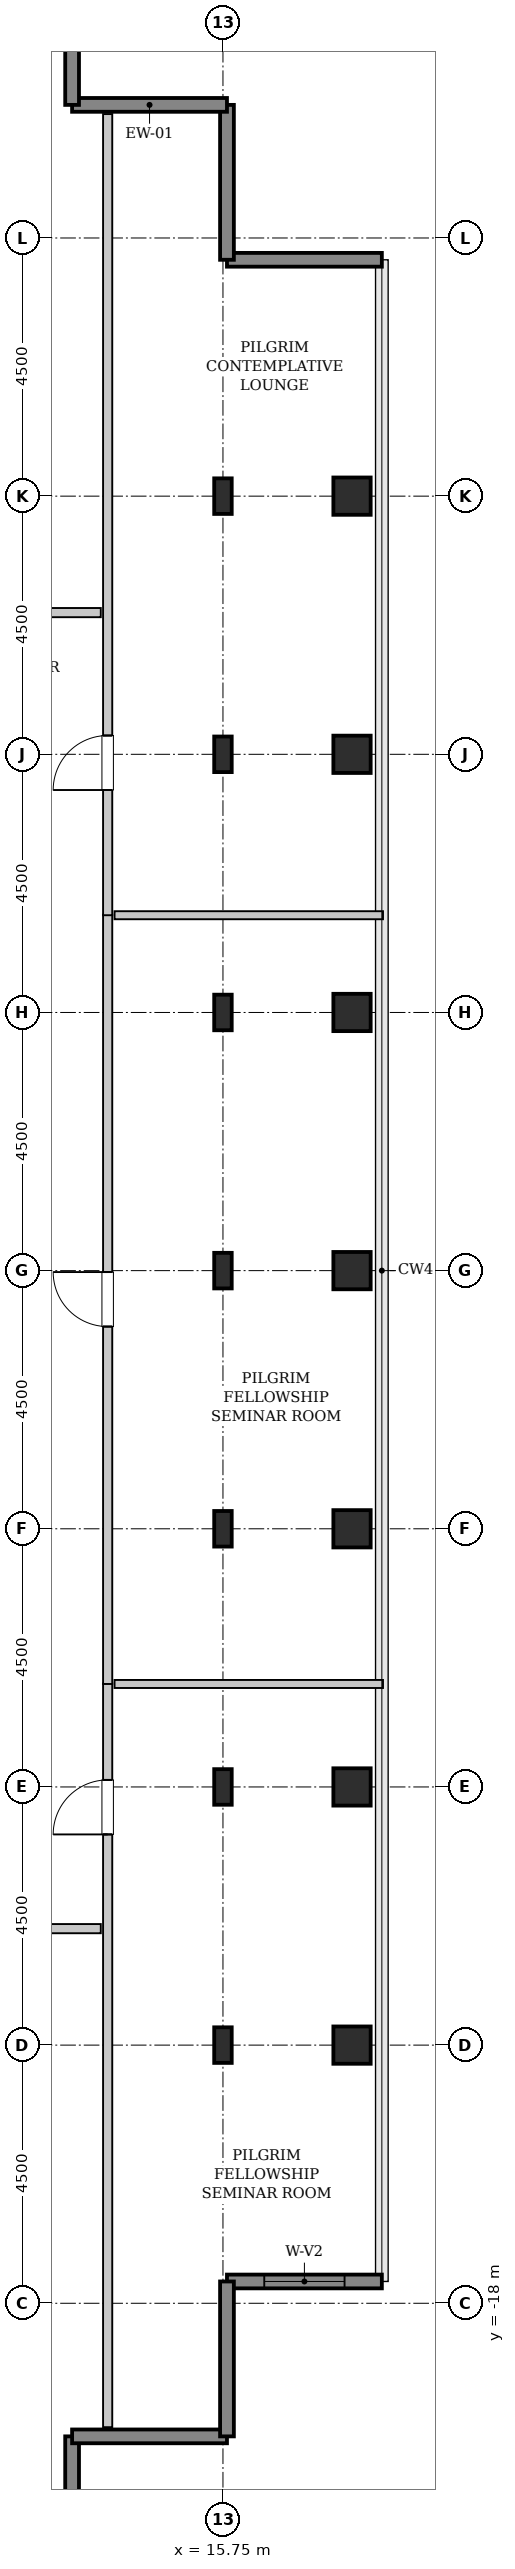
"""IFC4 building model, lengths in metres.
Left out: names, types, materials, properties, quantities, classifications, styles, units other than length and angle.
Written with IfcOpenShell. Run it as: python <this file> out.ifc"""

import sys

from ifc_helpers import new_model, si_unit, direction, frame, frame_2d, origin, origin_2d, place, context, subcontext, project, spatial, rectangle, hollow_rectangle, i_section, extrude, source, transform, mapped, element, fill, save


model = new_model("IFC4")
c1 = context("Model", 3, precision=1e-05, world=origin(), true_north=direction((0.0, 1.0)))
c2 = subcontext(c1, "Body", "Model", "MODEL_VIEW")
j1 = project(units=[si_unit("LENGTHUNIT", "METRE"), si_unit("PLANEANGLEUNIT", "RADIAN")], contexts=[c1])
p1 = place(None, origin())
s1 = spatial("IfcSite", under=j1, at=p1, CompositionType="ELEMENT")
p2 = place(p1, origin())
s2 = spatial("IfcBuilding", under=s1, at=p2, CompositionType="ELEMENT")
p3 = place(p2, frame((0.0, 0.0, 283.6)))
s3 = spatial("IfcBuildingStorey", under=s2, at=p3, CompositionType="ELEMENT", Elevation=283.6)
m1 = source(origin(), c2, "Body", "SweptSolid", [
    extrude(i_section(OverallWidth=0.305, OverallDepth=0.62, WebThickness=0.021, FlangeThickness=0.04, FilletRadius=0.027, at=origin_2d()), origin(), (0.0, 0.0, 1.0), 3.8),
])
for number, where, z_axis, x_axis in (
    (1, (15.75, -13.5, 0.0), (0.0, 0.0, 1.0), (1.0, 0.0, 0.0)),
    (2, (15.75, -9.0, 0.0), (0.0, 0.0, 1.0), (1.0, 0.0, 0.0)),
    (3, (15.75, -4.5, 0.0), (0.0, 0.0, 1.0), (1.0, 0.0, 0.0)),
    (4, (15.75, 0.0, 0.0), (0.0, 0.0, 1.0), (1.0, 0.0, 0.0)),
    (5, (15.75, 4.5, 0.0), (0.0, 0.0, 1.0), (1.0, 0.0, 0.0)),
    (6, (15.75, 9.0, 0.0), (0.0, 0.0, 1.0), (1.0, 0.0, 0.0)),
    (7, (15.75, 13.5, 0.0), (0.0, 0.0, 1.0), (1.0, 0.0, 0.0)),
):
    element("IfcColumn", number, at=place(p3, frame(where, z_axis=z_axis, x_axis=x_axis)), inside=s3, PredefinedType="COLUMN", context=c2, shape_type="MappedRepresentation", body=[
        mapped(m1, transform((0.0, 0.0, 0.0), x_axis=(1.0, 0.0, 0.0), y_axis=(0.0, 1.0, 0.0), z_axis=(0.0, 0.0, 1.0), scale=1.0)),
    ])
m2 = source(origin(), c2, "Body", "SweptSolid", [
    extrude(hollow_rectangle(XDim=0.65, YDim=0.65, WallThickness=0.032, InnerFilletRadius=0.032, OuterFilletRadius=0.064, at=origin_2d()), origin(), (0.0, 0.0, 1.0), 3.8),
])
for number, where, z_axis, x_axis in (
    (8, (18.0, -13.5, 0.0), (0.0, 0.0, 1.0), (1.0, 0.0, 0.0)),
    (9, (18.0, -9.0, 0.0), (0.0, 0.0, 1.0), (1.0, 0.0, 0.0)),
    (10, (18.0, -4.5, 0.0), (0.0, 0.0, 1.0), (1.0, 0.0, 0.0)),
    (11, (18.0, 0.0, 0.0), (0.0, 0.0, 1.0), (1.0, 0.0, 0.0)),
    (12, (18.0, 4.5, 0.0), (0.0, 0.0, 1.0), (1.0, 0.0, 0.0)),
    (13, (18.0, 9.0, 0.0), (0.0, 0.0, 1.0), (1.0, 0.0, 0.0)),
    (14, (18.0, 13.5, 0.0), (0.0, 0.0, 1.0), (1.0, 0.0, 0.0)),
):
    element("IfcColumn", number, at=place(p3, frame(where, z_axis=z_axis, x_axis=x_axis)), inside=s3, PredefinedType="COLUMN", context=c2, shape_type="MappedRepresentation", body=[
        mapped(m2, transform((0.0, 0.0, 0.0), x_axis=(1.0, 0.0, 0.0), y_axis=(0.0, 1.0, 0.0), z_axis=(0.0, 0.0, 1.0), scale=1.0)),
    ])
m3 = source(origin(), c2, "Body", "SweptSolid", [
    extrude(rectangle(XDim=2.7, YDim=0.24, at=frame_2d((1.35, 0.0))), origin(), (0.0, 0.0, 1.0), 3.55),
])
p4 = place(p3, frame((15.82, -17.62, 0.0), z_axis=(0.0, 0.0, 1.0), x_axis=(1.0, 0.0, 0.0)))
e15 = element("IfcWall", 15, at=p4, inside=s3, PredefinedType="SHEAR", context=c2, shape_type="MappedRepresentation", body=[
    mapped(m3, transform((0.0, 0.0, 0.0), x_axis=(1.0, 0.0, 0.0), y_axis=(0.0, 1.0, 0.0), z_axis=(0.0, 0.0, 1.0), scale=1.0)),
])
p5 = place(p4, frame((0.65, 0.0, 0.85)))
e16 = element("IfcOpeningElement", 16, at=p5, cuts=e15, PredefinedType="OPENING", context=c2, shape_type="SweptSolid", body=[
    extrude(rectangle(XDim=1.4, YDim=1.8, at=frame_2d((0.7, 0.9))), frame((0.0, 0.13, 0.0), z_axis=(0.0, -1.0, 0.0), x_axis=(1.0, 0.0, 0.0)), (0.0, 0.0, 1.0), 0.26),
])
for number, where, z_axis, x_axis in (
    (17, (18.52, 17.62, 0.0), (0.0, 0.0, 1.0), (-1.0, 0.0, 0.0)),
    (18, (15.82, 17.62, 0.0), (0.0, 0.0, 1.0), (0.0, 1.0, 0.0)),
    (19, (15.82, 20.32, 0.0), (0.0, 0.0, 1.0), (-1.0, 0.0, 0.0)),
    (20, (13.12, 20.32, 0.0), (0.0, 0.0, 1.0), (0.0, 1.0, 0.0)),
    (21, (13.12, -23.02, 0.0), (0.0, 0.0, 1.0), (0.0, 1.0, 0.0)),
    (22, (13.12, -20.32, 0.0), (0.0, 0.0, 1.0), (1.0, 0.0, 0.0)),
    (23, (15.82, -20.32, 0.0), (0.0, 0.0, 1.0), (0.0, 1.0, 0.0)),
):
    element("IfcWall", number, at=place(p3, frame(where, z_axis=z_axis, x_axis=x_axis)), inside=s3, PredefinedType="SHEAR", context=c2, shape_type="MappedRepresentation", body=[
        mapped(m3, transform((0.0, 0.0, 0.0), x_axis=(1.0, 0.0, 0.0), y_axis=(0.0, 1.0, 0.0), z_axis=(0.0, 0.0, 1.0), scale=1.0)),
    ])
m4 = source(origin(), c2, "Body", "SweptSolid", [
    extrude(rectangle(XDim=12.965, YDim=0.16, at=frame_2d((6.482, 0.0))), origin(), (0.0, 0.0, 1.0), 3.535),
])
p6 = place(p3, frame((13.74, -20.16, 0.0), z_axis=(0.0, 0.0, 1.0), x_axis=(0.0, 1.0, 0.0)))
e24 = element("IfcWall", 24, at=p6, inside=s3, PredefinedType="PARTITIONING", context=c2, shape_type="MappedRepresentation", body=[
    mapped(m4, transform((0.0, 0.0, 0.0), x_axis=(1.0, 0.0, 0.0), y_axis=(0.0, 1.0, 0.0), z_axis=(0.0, 0.0, 1.0), scale=1.0)),
])
p7 = place(p6, frame((10.333, 0.0, 0.0)))
e25 = element("IfcOpeningElement", 25, at=p7, cuts=e24, PredefinedType="OPENING", context=c2, shape_type="SweptSolid", body=[
    extrude(rectangle(XDim=0.95, YDim=2.1, at=frame_2d((0.475, 1.05))), frame((0.0, 0.09, 0.0), z_axis=(0.0, -1.0, 0.0), x_axis=(1.0, 0.0, 0.0)), (0.0, 0.0, 1.0), 0.18),
])
m5 = source(origin(), c2, "Body", "SweptSolid", [
    extrude(rectangle(XDim=4.68, YDim=0.14, at=frame_2d((2.34, 0.0))), origin(), (0.0, 0.0, 1.0), 3.535),
])
p8 = place(p3, frame((13.86, -7.205, 0.0), z_axis=(0.0, 0.0, 1.0), x_axis=(1.0, 0.0, 0.0)))
e26 = element("IfcWall", 26, at=p8, inside=s3, PredefinedType="PARTITIONING", context=c2, shape_type="MappedRepresentation", body=[
    mapped(m5, transform((0.0, 0.0, 0.0), x_axis=(1.0, 0.0, 0.0), y_axis=(0.0, 1.0, 0.0), z_axis=(0.0, 0.0, 1.0), scale=1.0)),
])
m6 = source(origin(), c2, "Body", "SweptSolid", [
    extrude(rectangle(XDim=13.41, YDim=0.16, at=frame_2d((6.705, 0.0))), origin(), (0.0, 0.0, 1.0), 3.535),
])
p9 = place(p3, frame((13.74, -7.205, 0.0), z_axis=(0.0, 0.0, 1.0), x_axis=(0.0, 1.0, 0.0)))
e27 = element("IfcWall", 27, at=p9, inside=s3, PredefinedType="PARTITIONING", context=c2, shape_type="MappedRepresentation", body=[
    mapped(m6, transform((0.0, 0.0, 0.0), x_axis=(1.0, 0.0, 0.0), y_axis=(0.0, 1.0, 0.0), z_axis=(0.0, 0.0, 1.0), scale=1.0)),
])
p10 = place(p9, frame((6.23, 0.0, 0.0)))
e28 = element("IfcOpeningElement", 28, at=p10, cuts=e27, PredefinedType="OPENING", context=c2, shape_type="SweptSolid", body=[
    extrude(rectangle(XDim=0.95, YDim=2.1, at=frame_2d((0.475, 1.05))), frame((0.0, 0.09, 0.0), z_axis=(0.0, -1.0, 0.0), x_axis=(1.0, 0.0, 0.0)), (0.0, 0.0, 1.0), 0.18),
])
p11 = place(p3, frame((13.86, 6.195, 0.0), z_axis=(0.0, 0.0, 1.0), x_axis=(1.0, 0.0, 0.0)))
e29 = element("IfcWall", 29, at=p11, inside=s3, PredefinedType="PARTITIONING", context=c2, shape_type="MappedRepresentation", body=[
    mapped(m5, transform((0.0, 0.0, 0.0), x_axis=(1.0, 0.0, 0.0), y_axis=(0.0, 1.0, 0.0), z_axis=(0.0, 0.0, 1.0), scale=1.0)),
])
m7 = source(origin(), c2, "Body", "SweptSolid", [
    extrude(rectangle(XDim=13.965, YDim=0.16, at=frame_2d((6.982, 0.0))), origin(), (0.0, 0.0, 1.0), 3.535),
])
p12 = place(p3, frame((13.74, 6.195, 0.0), z_axis=(0.0, 0.0, 1.0), x_axis=(0.0, 1.0, 0.0)))
e30 = element("IfcWall", 30, at=p12, inside=s3, PredefinedType="PARTITIONING", context=c2, shape_type="MappedRepresentation", body=[
    mapped(m7, transform((0.0, 0.0, 0.0), x_axis=(1.0, 0.0, 0.0), y_axis=(0.0, 1.0, 0.0), z_axis=(0.0, 0.0, 1.0), scale=1.0)),
])
p13 = place(p12, frame((2.183, 0.0, 0.0)))
e31 = element("IfcOpeningElement", 31, at=p13, cuts=e30, PredefinedType="OPENING", context=c2, shape_type="SweptSolid", body=[
    extrude(rectangle(XDim=0.95, YDim=2.1, at=frame_2d((0.475, 1.05))), frame((0.0, 0.09, 0.0), z_axis=(0.0, -1.0, 0.0), x_axis=(1.0, 0.0, 0.0)), (0.0, 0.0, 1.0), 0.18),
])
m8 = source(origin(), c2, "Body", "SweptSolid", [
    extrude(rectangle(XDim=6.825, YDim=0.16, at=frame_2d((3.413, 0.0))), origin(), (0.0, 0.0, 1.0), 3.535),
])
p14 = place(p3, frame((6.795, 11.47, 0.0), z_axis=(0.0, 0.0, 1.0), x_axis=(1.0, 0.0, 0.0)))
e32 = element("IfcWall", 32, at=p14, inside=s3, PredefinedType="PARTITIONING", context=c2, shape_type="MappedRepresentation", body=[
    mapped(m8, transform((0.0, 0.0, 0.0), x_axis=(1.0, 0.0, 0.0), y_axis=(0.0, 1.0, 0.0), z_axis=(0.0, 0.0, 1.0), scale=1.0)),
])
p15 = place(p14, frame((2.938, 0.0, 0.0)))
e33 = element("IfcOpeningElement", 33, at=p15, cuts=e32, PredefinedType="OPENING", context=c2, shape_type="SweptSolid", body=[
    extrude(rectangle(XDim=0.95, YDim=2.1, at=frame_2d((0.475, 1.05))), frame((0.0, 0.09, 0.0), z_axis=(0.0, -1.0, 0.0), x_axis=(1.0, 0.0, 0.0)), (0.0, 0.0, 1.0), 0.18),
])
m9 = source(origin(), c2, "Body", "SweptSolid", [
    extrude(rectangle(XDim=6.025, YDim=0.16, at=frame_2d((3.013, 0.0))), origin(), (0.0, 0.0, 1.0), 3.535),
])
p16 = place(p3, frame((7.595, -11.47, 0.0), z_axis=(0.0, 0.0, 1.0), x_axis=(1.0, 0.0, 0.0)))
e34 = element("IfcWall", 34, at=p16, inside=s3, PredefinedType="PARTITIONING", context=c2, shape_type="MappedRepresentation", body=[
    mapped(m9, transform((0.0, 0.0, 0.0), x_axis=(1.0, 0.0, 0.0), y_axis=(0.0, 1.0, 0.0), z_axis=(0.0, 0.0, 1.0), scale=1.0)),
])
p17 = place(p16, frame((2.538, 0.0, 0.0)))
e35 = element("IfcOpeningElement", 35, at=p17, cuts=e34, PredefinedType="OPENING", context=c2, shape_type="SweptSolid", body=[
    extrude(rectangle(XDim=0.95, YDim=2.1, at=frame_2d((0.475, 1.05))), frame((0.0, 0.09, 0.0), z_axis=(0.0, -1.0, 0.0), x_axis=(1.0, 0.0, 0.0)), (0.0, 0.0, 1.0), 0.18),
])
m10 = source(origin(), c2, "Body", "SweptSolid", [
    extrude(rectangle(XDim=1.4, YDim=1.8, at=frame_2d((0.7, 0.9))), frame((0.0, 0.03, 0.0), z_axis=(0.0, -1.0, 0.0), x_axis=(1.0, 0.0, 0.0)), (0.0, 0.0, 1.0), 0.06),
])
p18 = place(p5, origin())
e36 = element("IfcWindow", 36, at=p18, inside=s3, PartitioningType="SINGLE_PANEL", PredefinedType="WINDOW", context=c2, shape_type="MappedRepresentation", body=[
    mapped(m10, transform((0.0, 0.0, 0.0), x_axis=(1.0, 0.0, 0.0), y_axis=(0.0, 1.0, 0.0), z_axis=(0.0, 0.0, 1.0), scale=1.0)),
])
fill(e16, e36)
m11 = source(origin(), c2, "Body", "SweptSolid", [
    extrude(rectangle(XDim=0.95, YDim=2.1, at=frame_2d((0.475, 1.05))), frame((0.0, 0.025, 0.0), z_axis=(0.0, -1.0, 0.0), x_axis=(1.0, 0.0, 0.0)), (0.0, 0.0, 1.0), 0.05),
])
p19 = place(p7, origin())
e37 = element("IfcDoor", 37, at=p19, inside=s3, OperationType="SINGLE_SWING_LEFT", PredefinedType="DOOR", context=c2, shape_type="MappedRepresentation", body=[
    mapped(m11, transform((0.0, 0.0, 0.0), x_axis=(1.0, 0.0, 0.0), y_axis=(0.0, 1.0, 0.0), z_axis=(0.0, 0.0, 1.0), scale=1.0)),
])
fill(e25, e37)
p20 = place(p10, origin())
e38 = element("IfcDoor", 38, at=p20, inside=s3, OperationType="SINGLE_SWING_RIGHT", PredefinedType="DOOR", context=c2, shape_type="MappedRepresentation", body=[
    mapped(m11, transform((0.0, 0.0, 0.0), x_axis=(1.0, 0.0, 0.0), y_axis=(0.0, 1.0, 0.0), z_axis=(0.0, 0.0, 1.0), scale=1.0)),
])
fill(e28, e38)
p21 = place(p13, origin())
e39 = element("IfcDoor", 39, at=p21, inside=s3, OperationType="SINGLE_SWING_LEFT", PredefinedType="DOOR", context=c2, shape_type="MappedRepresentation", body=[
    mapped(m11, transform((0.0, 0.0, 0.0), x_axis=(1.0, 0.0, 0.0), y_axis=(0.0, 1.0, 0.0), z_axis=(0.0, 0.0, 1.0), scale=1.0)),
])
fill(e31, e39)
save(model, sys.argv[1])
